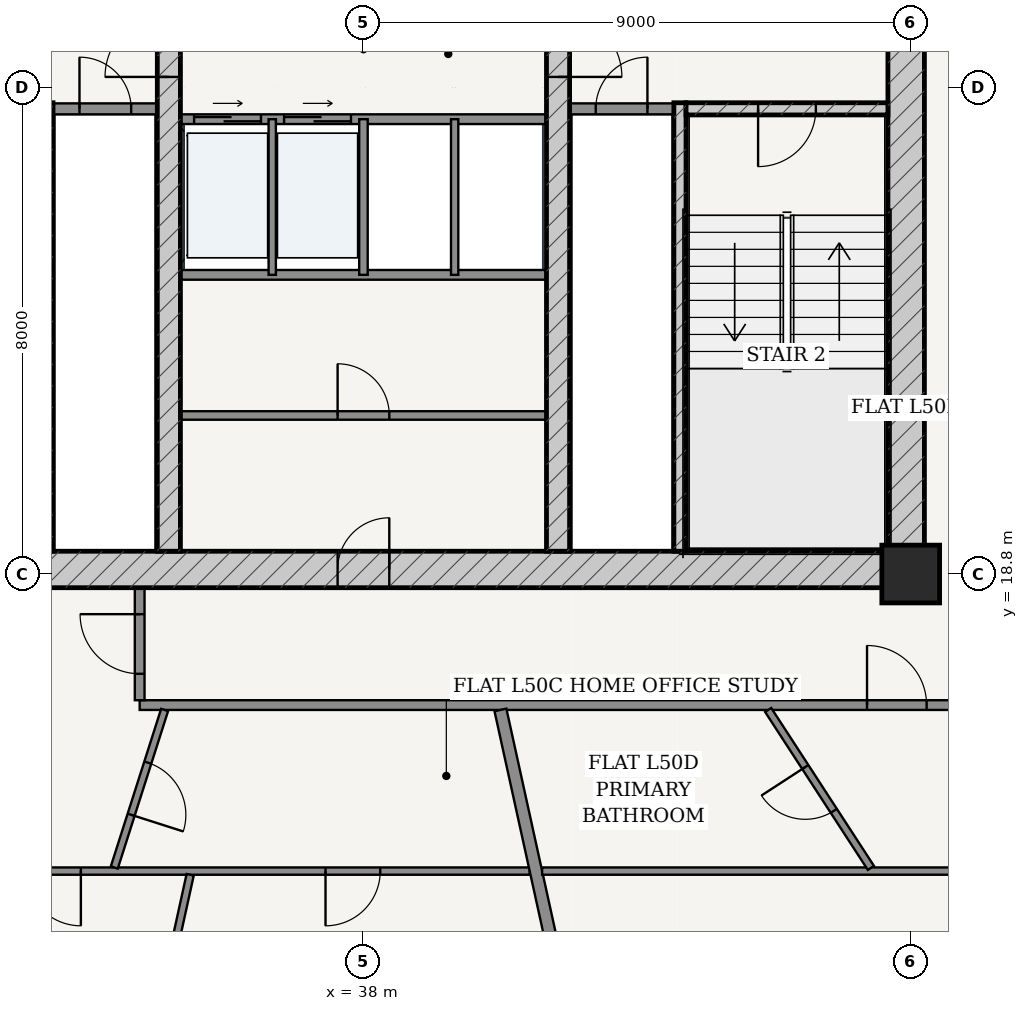
"""IFC4 building model, lengths in metres.
Left out: names, types, materials, properties, quantities, classifications, styles, units other than length and angle.
Written with IfcOpenShell. Run it as: python <this file> out.ifc"""

import sys

from ifc_helpers import new_model, si_unit, direction, frame, frame_2d, origin, origin_2d, place, context, subcontext, project, spatial, rectangle, extrude, source, transform, mapped, element, fill, save


model = new_model("IFC4")
c1 = context("Model", 3, precision=1e-05, world=origin(), true_north=direction((-0.2419218956, 0.970295726276)))
c2 = subcontext(c1, "Body", "Model", "MODEL_VIEW")
j1 = project(units=[si_unit("LENGTHUNIT", "METRE"), si_unit("PLANEANGLEUNIT", "RADIAN")], contexts=[c1])
p1 = place(None, origin())
s1 = spatial("IfcSite", under=j1, at=p1, CompositionType="ELEMENT")
p2 = place(p1, origin())
s2 = spatial("IfcBuilding", under=s1, at=p2, CompositionType="ELEMENT")
p3 = place(p2, frame((0.0, 0.0, 191.2)))
s3 = spatial("IfcBuildingStorey", under=s2, at=p3, CompositionType="ELEMENT", Elevation=191.2)
p4 = place(p3, frame((47.0, 18.8, 0.0), z_axis=(0.0, 0.0, 1.0), x_axis=(1.0, 0.0, 0.0)))
e1 = element("IfcColumn", 1, at=p4, inside=s3, PredefinedType="COLUMN", context=c2, shape_type="SweptSolid", body=[
    extrude(rectangle(XDim=0.95, YDim=0.95, at=origin_2d()), origin(), (0.0, 0.0, 1.0), 3.7),
])
p5 = place(p3, frame((28.775, 18.875, 0.0), z_axis=(0.0, 0.0, 1.0), x_axis=(1.0, 0.0, 0.0)))
e2 = element("IfcWall", 2, at=p5, inside=s3, PredefinedType="SHEAR", context=c2, shape_type="SweptSolid", body=[
    extrude(rectangle(XDim=18.45, YDim=0.6, at=frame_2d((9.225, 0.0))), origin(), (0.0, 0.0, 1.0), 3.435),
])
p6 = place(p5, frame((8.8, 0.0, 0.0)))
e3 = element("IfcOpeningElement", 3, at=p6, cuts=e2, PredefinedType="OPENING", context=c2, shape_type="SweptSolid", body=[
    extrude(rectangle(XDim=0.85, YDim=2.1, at=frame_2d((0.425, 1.05))), frame((0.0, 0.31, 0.0), z_axis=(0.0, -1.0, 0.0), x_axis=(1.0, 0.0, 0.0)), (0.0, 0.0, 1.0), 0.62),
])
p7 = place(p3, frame((46.925, 19.175, 0.0), z_axis=(0.0, 0.0, 1.0), x_axis=(0.0, 1.0, 0.0)))
e4 = element("IfcWall", 4, at=p7, inside=s3, PredefinedType="SHEAR", context=c2, shape_type="SweptSolid", body=[
    extrude(rectangle(XDim=15.25, YDim=0.6, at=frame_2d((7.625, 0.0))), origin(), (0.0, 0.0, 1.0), 3.435),
])
p8 = place(p7, frame((9.875, 0.0, 0.0)))
e5 = element("IfcOpeningElement", 5, at=p8, cuts=e4, PredefinedType="OPENING", context=c2, shape_type="SweptSolid", body=[
    extrude(rectangle(XDim=1.5, YDim=2.2, at=frame_2d((0.75, 1.1))), frame((0.0, 0.31, 0.0), z_axis=(0.0, -1.0, 0.0), x_axis=(1.0, 0.0, 0.0)), (0.0, 0.0, 1.0), 0.62),
])
for number, where, z_axis, x_axis in (
    (6, (32.795, 19.175, 0.0), (0.0, 0.0, 1.0), (0.0, 1.0, 0.0)),
    (7, (43.205, 19.175, 0.0), (0.0, 0.0, 1.0), (0.0, 1.0, 0.0)),
):
    element("IfcWall", number, at=place(p3, frame(where, z_axis=z_axis, x_axis=x_axis)), inside=s3, PredefinedType="SOLIDWALL", context=c2, shape_type="SweptSolid", body=[
        extrude(rectangle(XDim=7.375, YDim=0.2, at=frame_2d((3.688, 0.0))), origin(), (0.0, 0.0, 1.0), 3.435),
    ])
p9 = place(p3, frame((43.305, 26.45, 0.0), z_axis=(0.0, 0.0, 1.0), x_axis=(1.0, 0.0, 0.0)))
e8 = element("IfcWall", 8, at=p9, inside=s3, PredefinedType="SOLIDWALL", context=c2, shape_type="SweptSolid", body=[
    extrude(rectangle(XDim=3.32, YDim=0.2, at=frame_2d((1.66, 0.0))), origin(), (0.0, 0.0, 1.0), 3.435),
])
p10 = place(p9, frame((1.185, 0.0, 0.0)))
e9 = element("IfcOpeningElement", 9, at=p10, cuts=e8, PredefinedType="OPENING", context=c2, shape_type="SweptSolid", body=[
    extrude(rectangle(XDim=0.95, YDim=2.15, at=frame_2d((0.475, 1.075))), frame((0.0, 0.11, 0.0), z_axis=(0.0, -1.0, 0.0), x_axis=(1.0, 0.0, 0.0)), (0.0, 0.0, 1.0), 0.22),
])
p11 = place(p3, frame((34.8, 19.175, 0.0), z_axis=(0.0, 0.0, 1.0), x_axis=(0.0, 1.0, 0.0)))
e10 = element("IfcWall", 10, at=p11, inside=s3, PredefinedType="SHEAR", context=c2, shape_type="SweptSolid", body=[
    extrude(rectangle(XDim=15.25, YDim=0.38, at=frame_2d((7.625, 0.0))), origin(), (0.0, 0.0, 1.0), 3.435),
])
p12 = place(p11, frame((7.8, 0.0, 0.0)))
e11 = element("IfcOpeningElement", 11, at=p12, cuts=e10, PredefinedType="OPENING", context=c2, shape_type="SweptSolid", body=[
    extrude(rectangle(XDim=1.05, YDim=2.15, at=frame_2d((0.525, 1.075))), frame((0.0, 0.2, 0.0), z_axis=(0.0, -1.0, 0.0), x_axis=(1.0, 0.0, 0.0)), (0.0, 0.0, 1.0), 0.4),
])
p13 = place(p3, frame((41.2, 19.175, 0.0), z_axis=(0.0, 0.0, 1.0), x_axis=(0.0, 1.0, 0.0)))
e12 = element("IfcWall", 12, at=p13, inside=s3, PredefinedType="SHEAR", context=c2, shape_type="SweptSolid", body=[
    extrude(rectangle(XDim=15.25, YDim=0.38, at=frame_2d((7.625, 0.0))), origin(), (0.0, 0.0, 1.0), 3.435),
])
p14 = place(p13, frame((7.8, 0.0, 0.0)))
e13 = element("IfcOpeningElement", 13, at=p14, cuts=e12, PredefinedType="OPENING", context=c2, shape_type="SweptSolid", body=[
    extrude(rectangle(XDim=1.05, YDim=2.15, at=frame_2d((0.525, 1.075))), frame((0.0, 0.2, 0.0), z_axis=(0.0, -1.0, 0.0), x_axis=(1.0, 0.0, 0.0)), (0.0, 0.0, 1.0), 0.4),
])
p15 = place(p3, frame((32.9, 26.45, 0.0), z_axis=(0.0, 0.0, 1.0), x_axis=(1.0, 0.0, 0.0)))
e14 = element("IfcWall", 14, at=p15, inside=s3, PredefinedType="PARTITIONING", context=c2, shape_type="SweptSolid", body=[
    extrude(rectangle(XDim=1.71, YDim=0.18, at=frame_2d((0.855, 0.0))), origin(), (0.0, 0.0, 1.0), 3.435),
])
p16 = place(p15, frame((0.43, 0.0, 0.0)))
e15 = element("IfcOpeningElement", 15, at=p16, cuts=e14, PredefinedType="OPENING", context=c2, shape_type="SweptSolid", body=[
    extrude(rectangle(XDim=0.85, YDim=2.1, at=frame_2d((0.425, 1.05))), frame((0.0, 0.1, 0.0), z_axis=(0.0, -1.0, 0.0), x_axis=(1.0, 0.0, 0.0)), (0.0, 0.0, 1.0), 0.2),
])
p17 = place(p3, frame((41.39, 26.45, 0.0), z_axis=(0.0, 0.0, 1.0), x_axis=(1.0, 0.0, 0.0)))
e16 = element("IfcWall", 16, at=p17, inside=s3, PredefinedType="PARTITIONING", context=c2, shape_type="SweptSolid", body=[
    extrude(rectangle(XDim=1.71, YDim=0.18, at=frame_2d((0.855, 0.0))), origin(), (0.0, 0.0, 1.0), 3.435),
])
p18 = place(p17, frame((0.43, 0.0, 0.0)))
e17 = element("IfcOpeningElement", 17, at=p18, cuts=e16, PredefinedType="OPENING", context=c2, shape_type="SweptSolid", body=[
    extrude(rectangle(XDim=0.85, YDim=2.1, at=frame_2d((0.425, 1.05))), frame((0.0, 0.1, 0.0), z_axis=(0.0, -1.0, 0.0), x_axis=(1.0, 0.0, 0.0)), (0.0, 0.0, 1.0), 0.2),
])
p19 = place(p3, frame((34.99, 26.28, 0.0), z_axis=(0.0, 0.0, 1.0), x_axis=(1.0, 0.0, 0.0)))
e18 = element("IfcWall", 18, at=p19, inside=s3, PredefinedType="PARTITIONING", context=c2, shape_type="SweptSolid", body=[
    extrude(rectangle(XDim=6.02, YDim=0.16, at=frame_2d((3.01, 0.0))), origin(), (0.0, 0.0, 1.0), 3.435),
])
p20 = place(p19, frame((0.225, 0.0, 0.0)))
e19 = element("IfcOpeningElement", 19, at=p20, cuts=e18, PredefinedType="OPENING", context=c2, shape_type="SweptSolid", body=[
    extrude(rectangle(XDim=1.1, YDim=2.2, at=frame_2d((0.55, 1.1))), frame((0.0, 0.09, 0.0), z_axis=(0.0, -1.0, 0.0), x_axis=(1.0, 0.0, 0.0)), (0.0, 0.0, 1.0), 0.18),
])
p21 = place(p19, frame((1.705, 0.0, 0.0)))
e20 = element("IfcOpeningElement", 20, at=p21, cuts=e18, PredefinedType="OPENING", context=c2, shape_type="SweptSolid", body=[
    extrude(rectangle(XDim=1.1, YDim=2.2, at=frame_2d((0.55, 1.1))), frame((0.0, 0.09, 0.0), z_axis=(0.0, -1.0, 0.0), x_axis=(1.0, 0.0, 0.0)), (0.0, 0.0, 1.0), 0.18),
])
p22 = place(p3, frame((34.99, 23.72, 0.0), z_axis=(0.0, 0.0, 1.0), x_axis=(1.0, 0.0, 0.0)))
e21 = element("IfcWall", 21, at=p22, inside=s3, PredefinedType="PARTITIONING", context=c2, shape_type="SweptSolid", body=[
    extrude(rectangle(XDim=6.02, YDim=0.16, at=frame_2d((3.01, 0.0))), origin(), (0.0, 0.0, 1.0), 3.435),
])
p23 = place(p3, frame((36.5, 23.72, 0.0), z_axis=(0.0, 0.0, 1.0), x_axis=(0.0, 1.0, 0.0)))
e22 = element("IfcWall", 22, at=p23, inside=s3, PredefinedType="PARTITIONING", context=c2, shape_type="SweptSolid", body=[
    extrude(rectangle(XDim=2.56, YDim=0.12, at=frame_2d((1.28, 0.0))), origin(), (0.0, 0.0, 1.0), 3.435),
])
p24 = place(p3, frame((38.0, 23.72, 0.0), z_axis=(0.0, 0.0, 1.0), x_axis=(0.0, 1.0, 0.0)))
e23 = element("IfcWall", 23, at=p24, inside=s3, PredefinedType="PARTITIONING", context=c2, shape_type="SweptSolid", body=[
    extrude(rectangle(XDim=2.56, YDim=0.14, at=frame_2d((1.28, 0.0))), origin(), (0.0, 0.0, 1.0), 3.435),
])
p25 = place(p3, frame((39.5, 23.72, 0.0), z_axis=(0.0, 0.0, 1.0), x_axis=(0.0, 1.0, 0.0)))
e24 = element("IfcWall", 24, at=p25, inside=s3, PredefinedType="PARTITIONING", context=c2, shape_type="SweptSolid", body=[
    extrude(rectangle(XDim=2.56, YDim=0.12, at=frame_2d((1.28, 0.0))), origin(), (0.0, 0.0, 1.0), 3.435),
])
p26 = place(p3, frame((34.99, 21.407, 0.0), z_axis=(0.0, 0.0, 1.0), x_axis=(1.0, 0.0, 0.0)))
e25 = element("IfcWall", 25, at=p26, inside=s3, PredefinedType="PARTITIONING", context=c2, shape_type="SweptSolid", body=[
    extrude(rectangle(XDim=6.02, YDim=0.14, at=frame_2d((3.01, 0.0))), origin(), (0.0, 0.0, 1.0), 3.435),
])
p27 = place(p26, frame((2.585, 0.0, 0.0)))
e26 = element("IfcOpeningElement", 26, at=p27, cuts=e25, PredefinedType="OPENING", context=c2, shape_type="SweptSolid", body=[
    extrude(rectangle(XDim=0.85, YDim=2.1, at=frame_2d((0.425, 1.05))), frame((0.0, 0.08, 0.0), z_axis=(0.0, -1.0, 0.0), x_axis=(1.0, 0.0, 0.0)), (0.0, 0.0, 1.0), 0.16),
])
p28 = place(p3, frame((34.32, 16.645, 0.0), z_axis=(0.0, 0.0, 1.0), x_axis=(1.0, 0.0, 0.0)))
e27 = element("IfcWall", 27, at=p28, inside=s3, PredefinedType="PARTITIONING", context=c2, shape_type="SweptSolid", body=[
    extrude(rectangle(XDim=14.835, YDim=0.16, at=frame_2d((7.417, 0.0))), origin(), (0.0, 0.0, 1.0), 2.951),
])
p29 = place(p28, frame((11.961, 0.0, 0.0)))
e28 = element("IfcOpeningElement", 28, at=p29, cuts=e27, PredefinedType="OPENING", context=c2, shape_type="SweptSolid", body=[
    extrude(rectangle(XDim=0.98, YDim=2.2, at=frame_2d((0.49, 1.1))), frame((0.0, 0.09, 0.0), z_axis=(0.0, -1.0, 0.0), x_axis=(1.0, 0.0, 0.0)), (0.0, 0.0, 1.0), 0.18),
])
p30 = place(p3, frame((34.32, 16.725, 0.0), z_axis=(0.0, 0.0, 1.0), x_axis=(0.0, 1.0, 0.0)))
e29 = element("IfcWall", 29, at=p30, inside=s3, PredefinedType="PARTITIONING", context=c2, shape_type="SweptSolid", body=[
    extrude(rectangle(XDim=1.85, YDim=0.16, at=frame_2d((0.925, 0.0))), origin(), (0.0, 0.0, 1.0), 3.435),
])
p31 = place(p30, frame((0.435, 0.0, 0.0)))
e30 = element("IfcOpeningElement", 30, at=p31, cuts=e29, PredefinedType="OPENING", context=c2, shape_type="SweptSolid", body=[
    extrude(rectangle(XDim=0.98, YDim=2.2, at=frame_2d((0.49, 1.1))), frame((0.0, 0.09, 0.0), z_axis=(0.0, -1.0, 0.0), x_axis=(1.0, 0.0, 0.0)), (0.0, 0.0, 1.0), 0.18),
])
p32 = place(p3, frame((40.734, 13.915, 0.0), z_axis=(0.0, 0.0, 1.0), x_axis=(-1.0, 0.0, 0.0)))
e31 = element("IfcWall", 31, at=p32, inside=s3, PredefinedType="PARTITIONING", context=c2, shape_type="SweptSolid", body=[
    extrude(rectangle(XDim=9.144, YDim=0.12, at=frame_2d((4.572, 0.0))), origin(), (0.0, 0.0, 1.0), 2.951),
])
p33 = place(p32, frame((7.381, 0.0, 0.0)))
e32 = element("IfcOpeningElement", 32, at=p33, cuts=e31, PredefinedType="OPENING", context=c2, shape_type="SweptSolid", body=[
    extrude(rectangle(XDim=0.9, YDim=2.15, at=frame_2d((0.45, 1.075))), frame((0.0, 0.07, 0.0), z_axis=(0.0, -1.0, 0.0), x_axis=(1.0, 0.0, 0.0)), (0.0, 0.0, 1.0), 0.14),
])
p34 = place(p32, frame((2.458, 0.0, 0.0)))
e33 = element("IfcOpeningElement", 33, at=p34, cuts=e31, PredefinedType="OPENING", context=c2, shape_type="SweptSolid", body=[
    extrude(rectangle(XDim=0.9, YDim=2.15, at=frame_2d((0.45, 1.075))), frame((0.0, 0.07, 0.0), z_axis=(0.0, -1.0, 0.0), x_axis=(1.0, 0.0, 0.0)), (0.0, 0.0, 1.0), 0.14),
])
p35 = place(p3, frame((35.15, 13.854, 0.0), z_axis=(0.0, 0.0, 1.0), x_axis=(-0.214942949264, -0.976626606519, 0.0)))
e34 = element("IfcWall", 34, at=p35, inside=s3, PredefinedType="PARTITIONING", context=c2, shape_type="SweptSolid", body=[
    extrude(rectangle(XDim=6.427, YDim=0.12, at=frame_2d((3.213, 0.0))), origin(), (0.0, 0.0, 1.0), 2.951),
])
p36 = place(p3, frame((34.73, 16.565, 0.0), z_axis=(0.0, 0.0, 1.0), x_axis=(-0.304300161081, -0.952576197459, 0.0)))
e35 = element("IfcWall", 35, at=p36, inside=s3, PredefinedType="PARTITIONING", context=c2, shape_type="SweptSolid", body=[
    extrude(rectangle(XDim=2.72, YDim=0.12, at=frame_2d((1.36, 0.0))), origin(), (0.0, 0.0, 1.0), 3.11),
])
p37 = place(p36, frame((0.91, 0.0, 0.0)))
e36 = element("IfcOpeningElement", 36, at=p37, cuts=e35, PredefinedType="OPENING", context=c2, shape_type="SweptSolid", body=[
    extrude(rectangle(XDim=0.9, YDim=2.15, at=frame_2d((0.45, 1.075))), frame((0.0, 0.07, 0.0), z_axis=(0.0, -1.0, 0.0), x_axis=(1.0, 0.0, 0.0)), (0.0, 0.0, 1.0), 0.14),
])
p38 = place(p3, frame((40.253, 16.565, 0.0), z_axis=(0.0, 0.0, 1.0), x_axis=(0.214957946814, -0.976623305631, 0.0)))
e37 = element("IfcWall", 37, at=p38, inside=s3, PredefinedType="PARTITIONING", context=c2, shape_type="SweptSolid", body=[
    extrude(rectangle(XDim=9.202, YDim=0.2, at=frame_2d((4.601, 0.0))), origin(), (0.0, 0.0, 1.0), 2.951),
])
p39 = place(p3, frame((51.885, 13.915, 0.0), z_axis=(0.0, 0.0, 1.0), x_axis=(-1.0, 0.0, 0.0)))
e38 = element("IfcWall", 38, at=p39, inside=s3, PredefinedType="PARTITIONING", context=c2, shape_type="SweptSolid", body=[
    extrude(rectangle(XDim=10.947, YDim=0.12, at=frame_2d((5.473, 0.0))), origin(), (0.0, 0.0, 1.0), 2.951),
])
p40 = place(p39, frame((2.486, 0.0, 0.0)))
e39 = element("IfcOpeningElement", 39, at=p40, cuts=e38, PredefinedType="OPENING", context=c2, shape_type="SweptSolid", body=[
    extrude(rectangle(XDim=0.9, YDim=2.15, at=frame_2d((0.45, 1.075))), frame((0.0, 0.07, 0.0), z_axis=(0.0, -1.0, 0.0), x_axis=(1.0, 0.0, 0.0)), (0.0, 0.0, 1.0), 0.14),
])
p41 = place(p3, frame((44.656, 16.565, 0.0), z_axis=(0.0, 0.0, 1.0), x_axis=(0.545173870382, -0.838322999239, 0.0)))
e40 = element("IfcWall", 40, at=p41, inside=s3, PredefinedType="PARTITIONING", context=c2, shape_type="SweptSolid", body=[
    extrude(rectangle(XDim=3.099, YDim=0.12, at=frame_2d((1.549, 0.0))), origin(), (0.0, 0.0, 1.0), 3.11),
])
p42 = place(p41, frame((1.119, 0.0, 0.0)))
e41 = element("IfcOpeningElement", 41, at=p42, cuts=e40, PredefinedType="OPENING", context=c2, shape_type="SweptSolid", body=[
    extrude(rectangle(XDim=0.86, YDim=2.15, at=frame_2d((0.43, 1.075))), frame((0.0, 0.07, 0.0), z_axis=(0.0, -1.0, 0.0), x_axis=(1.0, 0.0, 0.0)), (0.0, 0.0, 1.0), 0.14),
])
m1 = source(origin(), c2, "Body", "SweptSolid", [
    extrude(rectangle(XDim=1.05, YDim=2.15, at=frame_2d((0.525, 1.075))), frame((0.0, 0.025, 0.0), z_axis=(0.0, -1.0, 0.0), x_axis=(1.0, 0.0, 0.0)), (0.0, 0.0, 1.0), 0.05),
])
p43 = place(p12, origin())
e42 = element("IfcDoor", 42, at=p43, inside=s3, OperationType="SINGLE_SWING_LEFT", PredefinedType="DOOR", context=c2, shape_type="MappedRepresentation", body=[
    mapped(m1, transform((0.0, 0.0, 0.0), scale=1.0)),
])
fill(e11, e42)
p44 = place(p14, frame((1.05, 0.0, 0.0), z_axis=(0.0, 0.0, 1.0), x_axis=(-1.0, 0.0, 0.0)))
e43 = element("IfcDoor", 43, at=p44, inside=s3, OperationType="SINGLE_SWING_RIGHT", PredefinedType="DOOR", context=c2, shape_type="MappedRepresentation", body=[
    mapped(m1, transform((0.0, 0.0, 0.0), scale=1.0)),
])
fill(e13, e43)
m2 = source(origin(), c2, "Body", "SweptSolid", [
    extrude(rectangle(XDim=0.95, YDim=2.15, at=frame_2d((0.475, 1.075))), frame((0.0, 0.025, 0.0), z_axis=(0.0, -1.0, 0.0), x_axis=(1.0, 0.0, 0.0)), (0.0, 0.0, 1.0), 0.05),
])
p45 = place(p10, frame((0.95, 0.0, 0.0), z_axis=(0.0, 0.0, 1.0), x_axis=(-1.0, 0.0, 0.0)))
e44 = element("IfcDoor", 44, at=p45, inside=s3, OperationType="SINGLE_SWING_RIGHT", PredefinedType="DOOR", context=c2, shape_type="MappedRepresentation", body=[
    mapped(m2, transform((0.0, 0.0, 0.0), scale=1.0)),
])
fill(e9, e44)
m3 = source(origin(), c2, "Body", "SweptSolid", [
    extrude(rectangle(XDim=0.85, YDim=2.1, at=frame_2d((0.425, 1.05))), frame((0.0, 0.025, 0.0), z_axis=(0.0, -1.0, 0.0), x_axis=(1.0, 0.0, 0.0)), (0.0, 0.0, 1.0), 0.05),
])
p46 = place(p16, origin())
e45 = element("IfcDoor", 45, at=p46, inside=s3, OperationType="SINGLE_SWING_LEFT", PredefinedType="DOOR", context=c2, shape_type="MappedRepresentation", body=[
    mapped(m3, transform((0.0, 0.0, 0.0), scale=1.0)),
])
fill(e15, e45)
p47 = place(p18, origin())
e46 = element("IfcDoor", 46, at=p47, inside=s3, OperationType="SINGLE_SWING_RIGHT", PredefinedType="DOOR", context=c2, shape_type="MappedRepresentation", body=[
    mapped(m3, transform((0.0, 0.0, 0.0), scale=1.0)),
])
fill(e17, e46)
p48 = place(p6, origin())
e47 = element("IfcDoor", 47, at=p48, inside=s3, OperationType="SINGLE_SWING_RIGHT", PredefinedType="DOOR", context=c2, shape_type="MappedRepresentation", body=[
    mapped(m3, transform((0.0, 0.0, 0.0), scale=1.0)),
])
fill(e3, e47)
p49 = place(p27, origin())
e48 = element("IfcDoor", 48, at=p49, inside=s3, OperationType="SINGLE_SWING_LEFT", PredefinedType="DOOR", context=c2, shape_type="MappedRepresentation", body=[
    mapped(m3, transform((0.0, 0.0, 0.0), scale=1.0)),
])
fill(e26, e48)
m4 = source(origin(), c2, "Body", "SweptSolid", [
    extrude(rectangle(XDim=1.1, YDim=2.2, at=frame_2d((0.55, 1.1))), frame((0.0, 0.025, 0.0), z_axis=(0.0, -1.0, 0.0), x_axis=(1.0, 0.0, 0.0)), (0.0, 0.0, 1.0), 0.05),
])
p50 = place(p20, origin())
e49 = element("IfcDoor", 49, at=p50, inside=s3, OperationType="DOUBLE_DOOR_SLIDING", PredefinedType="DOOR", context=c2, shape_type="MappedRepresentation", body=[
    mapped(m4, transform((0.0, 0.0, 0.0), scale=1.0)),
])
fill(e19, e49)
p51 = place(p21, origin())
e50 = element("IfcDoor", 50, at=p51, inside=s3, OperationType="DOUBLE_DOOR_SLIDING", PredefinedType="DOOR", context=c2, shape_type="MappedRepresentation", body=[
    mapped(m4, transform((0.0, 0.0, 0.0), scale=1.0)),
])
fill(e20, e50)
m5 = source(origin(), c2, "Body", "SweptSolid", [
    extrude(rectangle(XDim=0.98, YDim=2.2, at=frame_2d((0.49, 1.1))), frame((0.0, 0.025, 0.0), z_axis=(0.0, -1.0, 0.0), x_axis=(1.0, 0.0, 0.0)), (0.0, 0.0, 1.0), 0.05),
])
p52 = place(p31, origin())
e51 = element("IfcDoor", 51, at=p52, inside=s3, OperationType="SINGLE_SWING_RIGHT", PredefinedType="DOOR", context=c2, shape_type="MappedRepresentation", body=[
    mapped(m5, transform((0.0, 0.0, 0.0), scale=1.0)),
])
fill(e30, e51)
m6 = source(origin(), c2, "Body", "SweptSolid", [
    extrude(rectangle(XDim=0.9, YDim=2.15, at=frame_2d((0.45, 1.075))), frame((0.0, 0.025, 0.0), z_axis=(0.0, -1.0, 0.0), x_axis=(1.0, 0.0, 0.0)), (0.0, 0.0, 1.0), 0.05),
])
p53 = place(p37, origin())
e52 = element("IfcDoor", 52, at=p53, inside=s3, OperationType="SINGLE_SWING_RIGHT", PredefinedType="DOOR", context=c2, shape_type="MappedRepresentation", body=[
    mapped(m6, transform((0.0, 0.0, 0.0), scale=1.0)),
])
fill(e36, e52)
p54 = place(p33, origin())
e53 = element("IfcDoor", 53, at=p54, inside=s3, OperationType="SINGLE_SWING_LEFT", PredefinedType="DOOR", context=c2, shape_type="MappedRepresentation", body=[
    mapped(m6, transform((0.0, 0.0, 0.0), scale=1.0)),
])
fill(e32, e53)
p55 = place(p34, origin())
e54 = element("IfcDoor", 54, at=p55, inside=s3, OperationType="SINGLE_SWING_RIGHT", PredefinedType="DOOR", context=c2, shape_type="MappedRepresentation", body=[
    mapped(m6, transform((0.0, 0.0, 0.0), scale=1.0)),
])
fill(e33, e54)
p56 = place(p29, origin())
e55 = element("IfcDoor", 55, at=p56, inside=s3, OperationType="SINGLE_SWING_LEFT", PredefinedType="DOOR", context=c2, shape_type="MappedRepresentation", body=[
    mapped(m5, transform((0.0, 0.0, 0.0), scale=1.0)),
])
fill(e28, e55)
m7 = source(origin(), c2, "Body", "SweptSolid", [
    extrude(rectangle(XDim=0.86, YDim=2.15, at=frame_2d((0.43, 1.075))), frame((0.0, 0.025, 0.0), z_axis=(0.0, -1.0, 0.0), x_axis=(1.0, 0.0, 0.0)), (0.0, 0.0, 1.0), 0.05),
])
p57 = place(p42, frame((0.86, 0.0, 0.0), z_axis=(0.0, 0.0, 1.0), x_axis=(-1.0, 0.0, 0.0)))
e56 = element("IfcDoor", 56, at=p57, inside=s3, OperationType="SINGLE_SWING_RIGHT", PredefinedType="DOOR", context=c2, shape_type="MappedRepresentation", body=[
    mapped(m7, transform((0.0, 0.0, 0.0), scale=1.0)),
])
fill(e41, e56)
save(model, sys.argv[1])
